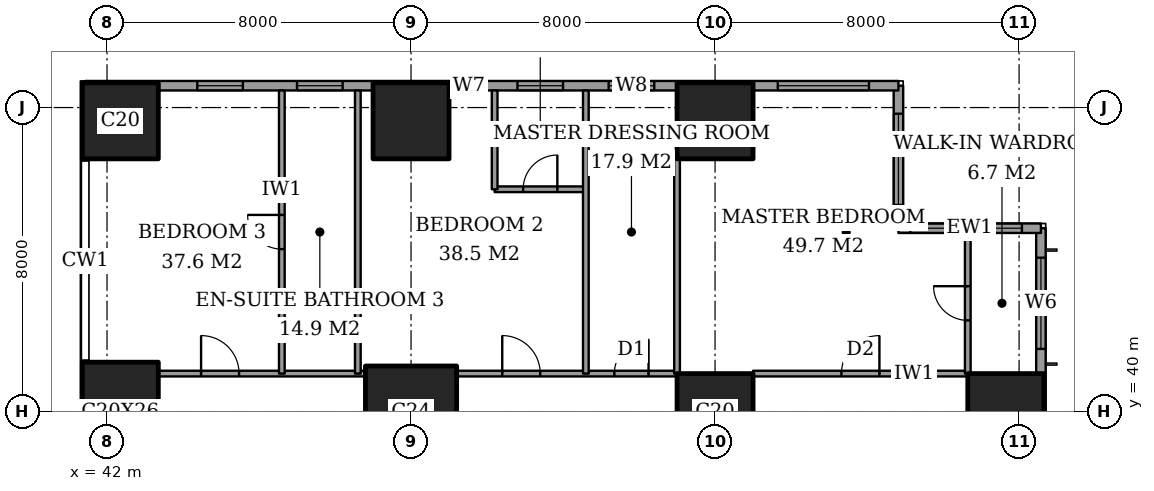
"""IFC4 building model, lengths in metres.
Left out: names, types, materials, properties, quantities, classifications, styles, units other than length and angle.
Written with IfcOpenShell. Run it as: python <this file> out.ifc"""

import sys

from ifc_helpers import new_model, si_unit, direction, frame, frame_2d, origin, origin_2d, place, context, subcontext, project, spatial, rectangle, extrude, element, fill, save


model = new_model("IFC4")
c1 = context("Model", 3, precision=1e-05, world=origin(), true_north=direction((0.0, 1.0)))
c2 = subcontext(c1, "Body", "Model", "MODEL_VIEW")
j1 = project(units=[si_unit("LENGTHUNIT", "METRE"), si_unit("PLANEANGLEUNIT", "RADIAN")], contexts=[c1])
p1 = place(None, origin())
s1 = spatial("IfcSite", under=j1, at=p1, CompositionType="ELEMENT")
p2 = place(p1, origin())
s2 = spatial("IfcBuilding", under=s1, at=p2, CompositionType="ELEMENT")
p3 = place(p2, frame((0.0, 0.0, 36.8)))
s3 = spatial("IfcBuildingStorey", under=s2, at=p3, CompositionType="ELEMENT", Elevation=36.8)
p4 = place(p3, frame((42.35, 40.0, 0.0), z_axis=(0.0, 0.0, 1.0), x_axis=(1.0, 0.0, 0.0)))
e1 = element("IfcColumn", 1, at=p4, inside=s3, PredefinedType="COLUMN", context=c2, shape_type="SweptSolid", body=[
    extrude(rectangle(XDim=2.0, YDim=2.6, at=origin_2d()), origin(), (0.0, 0.0, 1.0), 3.6),
])
p5 = place(p3, frame((42.35, 47.65, 0.0), z_axis=(0.0, 0.0, 1.0), x_axis=(1.0, 0.0, 0.0)))
e2 = element("IfcColumn", 2, at=p5, inside=s3, PredefinedType="COLUMN", context=c2, shape_type="SweptSolid", body=[
    extrude(rectangle(XDim=2.0, YDim=2.0, at=origin_2d()), origin(), (0.0, 0.0, 1.0), 3.6),
])
p6 = place(p3, frame((50.0, 40.0, 0.0), z_axis=(0.0, 0.0, 1.0), x_axis=(1.0, 0.0, 0.0)))
e3 = element("IfcColumn", 3, at=p6, inside=s3, PredefinedType="COLUMN", context=c2, shape_type="SweptSolid", body=[
    extrude(rectangle(XDim=2.4, YDim=2.4, at=origin_2d()), origin(), (0.0, 0.0, 1.0), 3.6),
])
for number, where, z_axis, x_axis in (
    (4, (50.0, 47.65, 0.0), (0.0, 0.0, 1.0), (1.0, 0.0, 0.0)),
    (5, (58.0, 40.0, 0.0), (0.0, 0.0, 1.0), (1.0, 0.0, 0.0)),
    (6, (58.0, 47.65, 0.0), (0.0, 0.0, 1.0), (1.0, 0.0, 0.0)),
    (7, (65.65, 40.0, 0.0), (0.0, 0.0, 1.0), (1.0, 0.0, 0.0)),
):
    element("IfcColumn", number, at=place(p3, frame(where, z_axis=z_axis, x_axis=x_axis)), inside=s3, PredefinedType="COLUMN", context=c2, shape_type="SweptSolid", body=[
        extrude(rectangle(XDim=2.0, YDim=2.0, at=origin_2d()), origin(), (0.0, 0.0, 1.0), 3.6),
    ])
p7 = place(p3, frame((66.575, 3.175, 0.0), z_axis=(0.0, 0.0, 1.0), x_axis=(0.0, 1.0, 0.0)))
e8 = element("IfcWall", 8, at=p7, inside=s3, PredefinedType="SOLIDWALL", context=c2, shape_type="SweptSolid", body=[
    extrude(rectangle(XDim=41.65, YDim=0.25, at=frame_2d((20.825, 0.0))), origin(), (0.0, 0.0, 1.0), 3.6),
])
p8 = place(p7, frame((0.775, 0.0, 0.6)))
e9 = element("IfcOpeningElement", 9, at=p8, cuts=e8, PredefinedType="OPENING", context=c2, shape_type="SweptSolid", body=[
    extrude(rectangle(XDim=2.4, YDim=2.0, at=frame_2d((1.2, 1.0))), frame((0.0, 0.135, 0.0), z_axis=(0.0, -1.0, 0.0), x_axis=(1.0, 0.0, 0.0)), (0.0, 0.0, 1.0), 0.27),
])
p9 = place(p7, frame((6.1, 0.0, 0.6)))
e10 = element("IfcOpeningElement", 10, at=p9, cuts=e8, PredefinedType="OPENING", context=c2, shape_type="SweptSolid", body=[
    extrude(rectangle(XDim=1.2, YDim=2.0, at=frame_2d((0.6, 1.0))), frame((0.0, 0.135, 0.0), z_axis=(0.0, -1.0, 0.0), x_axis=(1.0, 0.0, 0.0)), (0.0, 0.0, 1.0), 0.27),
])
p10 = place(p7, frame((8.275, 0.0, 0.6)))
e11 = element("IfcOpeningElement", 11, at=p10, cuts=e8, PredefinedType="OPENING", context=c2, shape_type="SweptSolid", body=[
    extrude(rectangle(XDim=2.4, YDim=2.0, at=frame_2d((1.2, 1.0))), frame((0.0, 0.135, 0.0), z_axis=(0.0, -1.0, 0.0), x_axis=(1.0, 0.0, 0.0)), (0.0, 0.0, 1.0), 0.27),
])
p11 = place(p7, frame((15.775, 0.0, 0.6)))
e12 = element("IfcOpeningElement", 12, at=p11, cuts=e8, PredefinedType="OPENING", context=c2, shape_type="SweptSolid", body=[
    extrude(rectangle(XDim=2.4, YDim=2.0, at=frame_2d((1.2, 1.0))), frame((0.0, 0.135, 0.0), z_axis=(0.0, -1.0, 0.0), x_axis=(1.0, 0.0, 0.0)), (0.0, 0.0, 1.0), 0.27),
])
p12 = place(p7, frame((23.475, 0.0, 0.6)))
e13 = element("IfcOpeningElement", 13, at=p12, cuts=e8, PredefinedType="OPENING", context=c2, shape_type="SweptSolid", body=[
    extrude(rectangle(XDim=2.4, YDim=2.0, at=frame_2d((1.2, 1.0))), frame((0.0, 0.135, 0.0), z_axis=(0.0, -1.0, 0.0), x_axis=(1.0, 0.0, 0.0)), (0.0, 0.0, 1.0), 0.27),
])
p13 = place(p7, frame((30.975, 0.0, 0.6)))
e14 = element("IfcOpeningElement", 14, at=p13, cuts=e8, PredefinedType="OPENING", context=c2, shape_type="SweptSolid", body=[
    extrude(rectangle(XDim=2.4, YDim=2.0, at=frame_2d((1.2, 1.0))), frame((0.0, 0.135, 0.0), z_axis=(0.0, -1.0, 0.0), x_axis=(1.0, 0.0, 0.0)), (0.0, 0.0, 1.0), 0.27),
])
p14 = place(p7, frame((34.5, 0.0, 0.6)))
e15 = element("IfcOpeningElement", 15, at=p14, cuts=e8, PredefinedType="OPENING", context=c2, shape_type="SweptSolid", body=[
    extrude(rectangle(XDim=1.2, YDim=2.0, at=frame_2d((0.6, 1.0))), frame((0.0, 0.135, 0.0), z_axis=(0.0, -1.0, 0.0), x_axis=(1.0, 0.0, 0.0)), (0.0, 0.0, 1.0), 0.27),
])
p15 = place(p7, frame((38.475, 0.0, 0.6)))
e16 = element("IfcOpeningElement", 16, at=p15, cuts=e8, PredefinedType="OPENING", context=c2, shape_type="SweptSolid", body=[
    extrude(rectangle(XDim=2.4, YDim=2.0, at=frame_2d((1.2, 1.0))), frame((0.0, 0.135, 0.0), z_axis=(0.0, -1.0, 0.0), x_axis=(1.0, 0.0, 0.0)), (0.0, 0.0, 1.0), 0.27),
])
p16 = place(p3, frame((66.575, 44.825, 0.0), z_axis=(0.0, 0.0, 1.0), x_axis=(-1.0, 0.0, 0.0)))
e17 = element("IfcWall", 17, at=p16, inside=s3, PredefinedType="SOLIDWALL", context=c2, shape_type="SweptSolid", body=[
    extrude(rectangle(XDim=3.75, YDim=0.25, at=frame_2d((1.875, 0.0))), origin(), (0.0, 0.0, 1.0), 3.6),
])
p17 = place(p16, frame((0.5, 0.0, 0.6)))
e18 = element("IfcOpeningElement", 18, at=p17, cuts=e17, PredefinedType="OPENING", context=c2, shape_type="SweptSolid", body=[
    extrude(rectangle(XDim=1.2, YDim=2.0, at=frame_2d((0.6, 1.0))), frame((0.0, 0.135, 0.0), z_axis=(0.0, -1.0, 0.0), x_axis=(1.0, 0.0, 0.0)), (0.0, 0.0, 1.0), 0.27),
])
p18 = place(p16, frame((2.238, 0.0, 0.6)))
e19 = element("IfcOpeningElement", 19, at=p18, cuts=e17, PredefinedType="OPENING", context=c2, shape_type="SweptSolid", body=[
    extrude(rectangle(XDim=1.2, YDim=2.0, at=frame_2d((0.6, 1.0))), frame((0.0, 0.135, 0.0), z_axis=(0.0, -1.0, 0.0), x_axis=(1.0, 0.0, 0.0)), (0.0, 0.0, 1.0), 0.27),
])
p19 = place(p3, frame((62.825, 44.825, 0.0), z_axis=(0.0, 0.0, 1.0), x_axis=(0.0, 1.0, 0.0)))
e20 = element("IfcWall", 20, at=p19, inside=s3, PredefinedType="SOLIDWALL", context=c2, shape_type="SweptSolid", body=[
    extrude(rectangle(XDim=3.75, YDim=0.25, at=frame_2d((1.875, 0.0))), origin(), (0.0, 0.0, 1.0), 3.6),
])
p20 = place(p19, frame((0.613, 0.0, 0.6)))
e21 = element("IfcOpeningElement", 21, at=p20, cuts=e20, PredefinedType="OPENING", context=c2, shape_type="SweptSolid", body=[
    extrude(rectangle(XDim=2.4, YDim=2.0, at=frame_2d((1.2, 1.0))), frame((0.0, 0.135, 0.0), z_axis=(0.0, -1.0, 0.0), x_axis=(1.0, 0.0, 0.0)), (0.0, 0.0, 1.0), 0.27),
])
p21 = place(p3, frame((62.825, 48.575, 0.0), z_axis=(0.0, 0.0, 1.0), x_axis=(-1.0, 0.0, 0.0)))
e22 = element("IfcWall", 22, at=p21, inside=s3, PredefinedType="SOLIDWALL", context=c2, shape_type="SweptSolid", body=[
    extrude(rectangle(XDim=21.4, YDim=0.25, at=frame_2d((10.7, 0.0))), origin(), (0.0, 0.0, 1.0), 3.6),
])
p22 = place(p21, frame((0.775, 0.0, 0.6)))
e23 = element("IfcOpeningElement", 23, at=p22, cuts=e22, PredefinedType="OPENING", context=c2, shape_type="SweptSolid", body=[
    extrude(rectangle(XDim=2.4, YDim=2.0, at=frame_2d((1.2, 1.0))), frame((0.0, 0.135, 0.0), z_axis=(0.0, -1.0, 0.0), x_axis=(1.0, 0.0, 0.0)), (0.0, 0.0, 1.0), 0.27),
])
p23 = place(p21, frame((6.425, 0.0, 0.6)))
e24 = element("IfcOpeningElement", 24, at=p23, cuts=e22, PredefinedType="OPENING", context=c2, shape_type="SweptSolid", body=[
    extrude(rectangle(XDim=1.2, YDim=2.0, at=frame_2d((0.6, 1.0))), frame((0.0, 0.135, 0.0), z_axis=(0.0, -1.0, 0.0), x_axis=(1.0, 0.0, 0.0)), (0.0, 0.0, 1.0), 0.27),
])
p24 = place(p21, frame((8.825, 0.0, 0.6)))
e25 = element("IfcOpeningElement", 25, at=p24, cuts=e22, PredefinedType="OPENING", context=c2, shape_type="SweptSolid", body=[
    extrude(rectangle(XDim=1.2, YDim=2.0, at=frame_2d((0.6, 1.0))), frame((0.0, 0.135, 0.0), z_axis=(0.0, -1.0, 0.0), x_axis=(1.0, 0.0, 0.0)), (0.0, 0.0, 1.0), 0.27),
])
p25 = place(p21, frame((11.0, 0.0, 0.6)))
e26 = element("IfcOpeningElement", 26, at=p25, cuts=e22, PredefinedType="OPENING", context=c2, shape_type="SweptSolid", body=[
    extrude(rectangle(XDim=0.6, YDim=2.0, at=frame_2d((0.3, 1.0))), frame((0.0, 0.135, 0.0), z_axis=(0.0, -1.0, 0.0), x_axis=(1.0, 0.0, 0.0)), (0.0, 0.0, 1.0), 0.27),
])
p26 = place(p21, frame((14.625, 0.0, 0.6)))
e27 = element("IfcOpeningElement", 27, at=p26, cuts=e22, PredefinedType="OPENING", context=c2, shape_type="SweptSolid", body=[
    extrude(rectangle(XDim=1.2, YDim=2.0, at=frame_2d((0.6, 1.0))), frame((0.0, 0.135, 0.0), z_axis=(0.0, -1.0, 0.0), x_axis=(1.0, 0.0, 0.0)), (0.0, 0.0, 1.0), 0.27),
])
p27 = place(p21, frame((17.25, 0.0, 0.6)))
e28 = element("IfcOpeningElement", 28, at=p27, cuts=e22, PredefinedType="OPENING", context=c2, shape_type="SweptSolid", body=[
    extrude(rectangle(XDim=1.2, YDim=2.0, at=frame_2d((0.6, 1.0))), frame((0.0, 0.135, 0.0), z_axis=(0.0, -1.0, 0.0), x_axis=(1.0, 0.0, 0.0)), (0.0, 0.0, 1.0), 0.27),
])
p28 = place(p3, frame((43.35, 41.0, 0.0), z_axis=(0.0, 0.0, 1.0), x_axis=(1.0, 0.0, 0.0)))
e29 = element("IfcWall", 29, at=p28, inside=s3, PredefinedType="PARTITIONING", context=c2, shape_type="SweptSolid", body=[
    extrude(rectangle(XDim=5.45, YDim=0.15, at=frame_2d((2.725, 0.0))), origin(), (0.0, 0.0, 1.0), 3.35),
])
p29 = place(p28, frame((1.125, 0.0, 0.0)))
e30 = element("IfcOpeningElement", 30, at=p29, cuts=e29, PredefinedType="OPENING", context=c2, shape_type="SweptSolid", body=[
    extrude(rectangle(XDim=1.0, YDim=2.1, at=frame_2d((0.5, 1.05))), frame((0.0, 0.085, 0.0), z_axis=(0.0, -1.0, 0.0), x_axis=(1.0, 0.0, 0.0)), (0.0, 0.0, 1.0), 0.17),
])
p30 = place(p3, frame((51.2, 41.0, 0.0), z_axis=(0.0, 0.0, 1.0), x_axis=(1.0, 0.0, 0.0)))
e31 = element("IfcWall", 31, at=p30, inside=s3, PredefinedType="PARTITIONING", context=c2, shape_type="SweptSolid", body=[
    extrude(rectangle(XDim=5.8, YDim=0.15, at=frame_2d((2.9, 0.0))), origin(), (0.0, 0.0, 1.0), 3.35),
])
p31 = place(p30, frame((4.15, 0.0, 0.0)))
e32 = element("IfcOpeningElement", 32, at=p31, cuts=e31, PredefinedType="OPENING", context=c2, shape_type="SweptSolid", body=[
    extrude(rectangle(XDim=0.9, YDim=2.1, at=frame_2d((0.45, 1.05))), frame((0.0, 0.085, 0.0), z_axis=(0.0, -1.0, 0.0), x_axis=(1.0, 0.0, 0.0)), (0.0, 0.0, 1.0), 0.17),
])
p32 = place(p30, frame((1.2, 0.0, 0.0)))
e33 = element("IfcOpeningElement", 33, at=p32, cuts=e31, PredefinedType="OPENING", context=c2, shape_type="SweptSolid", body=[
    extrude(rectangle(XDim=1.0, YDim=2.1, at=frame_2d((0.5, 1.05))), frame((0.0, 0.085, 0.0), z_axis=(0.0, -1.0, 0.0), x_axis=(1.0, 0.0, 0.0)), (0.0, 0.0, 1.0), 0.17),
])
p33 = place(p3, frame((59.0, 41.0, 0.0), z_axis=(0.0, 0.0, 1.0), x_axis=(1.0, 0.0, 0.0)))
e34 = element("IfcWall", 34, at=p33, inside=s3, PredefinedType="PARTITIONING", context=c2, shape_type="SweptSolid", body=[
    extrude(rectangle(XDim=5.65, YDim=0.15, at=frame_2d((2.825, 0.0))), origin(), (0.0, 0.0, 1.0), 3.35),
])
p34 = place(p33, frame((2.325, 0.0, 0.0)))
e35 = element("IfcOpeningElement", 35, at=p34, cuts=e34, PredefinedType="OPENING", context=c2, shape_type="SweptSolid", body=[
    extrude(rectangle(XDim=1.0, YDim=2.1, at=frame_2d((0.5, 1.05))), frame((0.0, 0.085, 0.0), z_axis=(0.0, -1.0, 0.0), x_axis=(1.0, 0.0, 0.0)), (0.0, 0.0, 1.0), 0.17),
])
p35 = place(p3, frame((52.2, 45.85, 0.0), z_axis=(0.0, 0.0, 1.0), x_axis=(1.0, 0.0, 0.0)))
e36 = element("IfcWall", 36, at=p35, inside=s3, PredefinedType="PARTITIONING", context=c2, shape_type="SweptSolid", body=[
    extrude(rectangle(XDim=2.4, YDim=0.15, at=frame_2d((1.2, 0.0))), origin(), (0.0, 0.0, 1.0), 3.35),
])
p36 = place(p35, frame((0.75, 0.0, 0.0)))
e37 = element("IfcOpeningElement", 37, at=p36, cuts=e36, PredefinedType="OPENING", context=c2, shape_type="SweptSolid", body=[
    extrude(rectangle(XDim=0.9, YDim=2.1, at=frame_2d((0.45, 1.05))), frame((0.0, 0.085, 0.0), z_axis=(0.0, -1.0, 0.0), x_axis=(1.0, 0.0, 0.0)), (0.0, 0.0, 1.0), 0.17),
])
p37 = place(p3, frame((46.6, 41.0, 0.0), z_axis=(0.0, 0.0, 1.0), x_axis=(0.0, 1.0, 0.0)))
e38 = element("IfcWall", 38, at=p37, inside=s3, PredefinedType="PARTITIONING", context=c2, shape_type="SweptSolid", body=[
    extrude(rectangle(XDim=7.45, YDim=0.15, at=frame_2d((3.725, 0.0))), origin(), (0.0, 0.0, 1.0), 3.35),
])
p38 = place(p37, frame((3.275, 0.0, 0.0)))
e39 = element("IfcOpeningElement", 39, at=p38, cuts=e38, PredefinedType="OPENING", context=c2, shape_type="SweptSolid", body=[
    extrude(rectangle(XDim=0.9, YDim=2.1, at=frame_2d((0.45, 1.05))), frame((0.0, 0.085, 0.0), z_axis=(0.0, -1.0, 0.0), x_axis=(1.0, 0.0, 0.0)), (0.0, 0.0, 1.0), 0.17),
])
p39 = place(p3, frame((48.6, 41.0, 0.0), z_axis=(0.0, 0.0, 1.0), x_axis=(0.0, 1.0, 0.0)))
e40 = element("IfcWall", 40, at=p39, inside=s3, PredefinedType="PARTITIONING", context=c2, shape_type="SweptSolid", body=[
    extrude(rectangle(XDim=7.45, YDim=0.15, at=frame_2d((3.725, 0.0))), origin(), (0.0, 0.0, 1.0), 3.35),
])
p40 = place(p3, frame((52.2, 45.85, 0.0), z_axis=(0.0, 0.0, 1.0), x_axis=(0.0, 1.0, 0.0)))
e41 = element("IfcWall", 41, at=p40, inside=s3, PredefinedType="PARTITIONING", context=c2, shape_type="SweptSolid", body=[
    extrude(rectangle(XDim=2.6, YDim=0.15, at=frame_2d((1.3, 0.0))), origin(), (0.0, 0.0, 1.0), 3.35),
])
p41 = place(p3, frame((54.6, 41.0, 0.0), z_axis=(0.0, 0.0, 1.0), x_axis=(0.0, 1.0, 0.0)))
e42 = element("IfcWall", 42, at=p41, inside=s3, PredefinedType="PARTITIONING", context=c2, shape_type="SweptSolid", body=[
    extrude(rectangle(XDim=7.45, YDim=0.15, at=frame_2d((3.725, 0.0))), origin(), (0.0, 0.0, 1.0), 3.35),
])
p42 = place(p3, frame((57.0, 41.0, 0.0), z_axis=(0.0, 0.0, 1.0), x_axis=(0.0, 1.0, 0.0)))
e43 = element("IfcWall", 43, at=p42, inside=s3, PredefinedType="PARTITIONING", context=c2, shape_type="SweptSolid", body=[
    extrude(rectangle(XDim=5.65, YDim=0.15, at=frame_2d((2.825, 0.0))), origin(), (0.0, 0.0, 1.0), 3.35),
])
p43 = place(p3, frame((64.65, 41.0, 0.0), z_axis=(0.0, 0.0, 1.0), x_axis=(0.0, 1.0, 0.0)))
e44 = element("IfcWall", 44, at=p43, inside=s3, PredefinedType="PARTITIONING", context=c2, shape_type="SweptSolid", body=[
    extrude(rectangle(XDim=3.7, YDim=0.15, at=frame_2d((1.85, 0.0))), origin(), (0.0, 0.0, 1.0), 3.35),
])
p44 = place(p43, frame((1.4, 0.0, 0.0)))
e45 = element("IfcOpeningElement", 45, at=p44, cuts=e44, PredefinedType="OPENING", context=c2, shape_type="SweptSolid", body=[
    extrude(rectangle(XDim=0.9, YDim=2.1, at=frame_2d((0.45, 1.05))), frame((0.0, 0.085, 0.0), z_axis=(0.0, -1.0, 0.0), x_axis=(1.0, 0.0, 0.0)), (0.0, 0.0, 1.0), 0.17),
])
p45 = place(p15, origin())
e46 = element("IfcWindow", 46, at=p45, inside=s3, PartitioningType="SINGLE_PANEL", PredefinedType="WINDOW", context=c2, shape_type="SweptSolid", body=[
    extrude(rectangle(XDim=2.4, YDim=2.0, at=frame_2d((1.2, 1.0))), frame((0.0, 0.03, 0.0), z_axis=(0.0, -1.0, 0.0), x_axis=(1.0, 0.0, 0.0)), (0.0, 0.0, 1.0), 0.06),
])
fill(e16, e46)
p46 = place(p17, origin())
e47 = element("IfcWindow", 47, at=p46, inside=s3, PartitioningType="SINGLE_PANEL", PredefinedType="WINDOW", context=c2, shape_type="SweptSolid", body=[
    extrude(rectangle(XDim=1.2, YDim=2.0, at=frame_2d((0.6, 1.0))), frame((0.0, 0.03, 0.0), z_axis=(0.0, -1.0, 0.0), x_axis=(1.0, 0.0, 0.0)), (0.0, 0.0, 1.0), 0.06),
])
fill(e18, e47)
p47 = place(p18, origin())
e48 = element("IfcWindow", 48, at=p47, inside=s3, PartitioningType="SINGLE_PANEL", PredefinedType="WINDOW", context=c2, shape_type="SweptSolid", body=[
    extrude(rectangle(XDim=1.2, YDim=2.0, at=frame_2d((0.6, 1.0))), frame((0.0, 0.03, 0.0), z_axis=(0.0, -1.0, 0.0), x_axis=(1.0, 0.0, 0.0)), (0.0, 0.0, 1.0), 0.06),
])
fill(e19, e48)
p48 = place(p20, origin())
e49 = element("IfcWindow", 49, at=p48, inside=s3, PartitioningType="SINGLE_PANEL", PredefinedType="WINDOW", context=c2, shape_type="SweptSolid", body=[
    extrude(rectangle(XDim=2.4, YDim=2.0, at=frame_2d((1.2, 1.0))), frame((0.0, 0.03, 0.0), z_axis=(0.0, -1.0, 0.0), x_axis=(1.0, 0.0, 0.0)), (0.0, 0.0, 1.0), 0.06),
])
fill(e21, e49)
p49 = place(p22, origin())
e50 = element("IfcWindow", 50, at=p49, inside=s3, PartitioningType="SINGLE_PANEL", PredefinedType="WINDOW", context=c2, shape_type="SweptSolid", body=[
    extrude(rectangle(XDim=2.4, YDim=2.0, at=frame_2d((1.2, 1.0))), frame((0.0, 0.03, 0.0), z_axis=(0.0, -1.0, 0.0), x_axis=(1.0, 0.0, 0.0)), (0.0, 0.0, 1.0), 0.06),
])
fill(e23, e50)
p50 = place(p23, origin())
e51 = element("IfcWindow", 51, at=p50, inside=s3, PartitioningType="SINGLE_PANEL", PredefinedType="WINDOW", context=c2, shape_type="SweptSolid", body=[
    extrude(rectangle(XDim=1.2, YDim=2.0, at=frame_2d((0.6, 1.0))), frame((0.0, 0.03, 0.0), z_axis=(0.0, -1.0, 0.0), x_axis=(1.0, 0.0, 0.0)), (0.0, 0.0, 1.0), 0.06),
])
fill(e24, e51)
p51 = place(p24, origin())
e52 = element("IfcWindow", 52, at=p51, inside=s3, PartitioningType="SINGLE_PANEL", PredefinedType="WINDOW", context=c2, shape_type="SweptSolid", body=[
    extrude(rectangle(XDim=1.2, YDim=2.0, at=frame_2d((0.6, 1.0))), frame((0.0, 0.03, 0.0), z_axis=(0.0, -1.0, 0.0), x_axis=(1.0, 0.0, 0.0)), (0.0, 0.0, 1.0), 0.06),
])
fill(e25, e52)
p52 = place(p25, origin())
e53 = element("IfcWindow", 53, at=p52, inside=s3, PartitioningType="SINGLE_PANEL", PredefinedType="WINDOW", context=c2, shape_type="SweptSolid", body=[
    extrude(rectangle(XDim=0.6, YDim=2.0, at=frame_2d((0.3, 1.0))), frame((0.0, 0.03, 0.0), z_axis=(0.0, -1.0, 0.0), x_axis=(1.0, 0.0, 0.0)), (0.0, 0.0, 1.0), 0.06),
])
fill(e26, e53)
p53 = place(p26, origin())
e54 = element("IfcWindow", 54, at=p53, inside=s3, PartitioningType="SINGLE_PANEL", PredefinedType="WINDOW", context=c2, shape_type="SweptSolid", body=[
    extrude(rectangle(XDim=1.2, YDim=2.0, at=frame_2d((0.6, 1.0))), frame((0.0, 0.03, 0.0), z_axis=(0.0, -1.0, 0.0), x_axis=(1.0, 0.0, 0.0)), (0.0, 0.0, 1.0), 0.06),
])
fill(e27, e54)
p54 = place(p27, origin())
e55 = element("IfcWindow", 55, at=p54, inside=s3, PartitioningType="SINGLE_PANEL", PredefinedType="WINDOW", context=c2, shape_type="SweptSolid", body=[
    extrude(rectangle(XDim=1.2, YDim=2.0, at=frame_2d((0.6, 1.0))), frame((0.0, 0.03, 0.0), z_axis=(0.0, -1.0, 0.0), x_axis=(1.0, 0.0, 0.0)), (0.0, 0.0, 1.0), 0.06),
])
fill(e28, e55)
p55 = place(p44, origin())
e56 = element("IfcDoor", 56, at=p55, inside=s3, OperationType="SINGLE_SWING_LEFT", PredefinedType="DOOR", context=c2, shape_type="SweptSolid", body=[
    extrude(rectangle(XDim=0.9, YDim=2.1, at=frame_2d((0.45, 1.05))), frame((0.0, 0.025, 0.0), z_axis=(0.0, -1.0, 0.0), x_axis=(1.0, 0.0, 0.0)), (0.0, 0.0, 1.0), 0.05),
])
fill(e45, e56)
p56 = place(p34, origin())
e57 = element("IfcDoor", 57, at=p56, inside=s3, OperationType="SINGLE_SWING_LEFT", PredefinedType="DOOR", context=c2, shape_type="SweptSolid", body=[
    extrude(rectangle(XDim=1.0, YDim=2.1, at=frame_2d((0.5, 1.05))), frame((0.0, 0.025, 0.0), z_axis=(0.0, -1.0, 0.0), x_axis=(1.0, 0.0, 0.0)), (0.0, 0.0, 1.0), 0.05),
])
fill(e35, e57)
p57 = place(p31, origin())
e58 = element("IfcDoor", 58, at=p57, inside=s3, OperationType="SINGLE_SWING_LEFT", PredefinedType="DOOR", context=c2, shape_type="SweptSolid", body=[
    extrude(rectangle(XDim=0.9, YDim=2.1, at=frame_2d((0.45, 1.05))), frame((0.0, 0.025, 0.0), z_axis=(0.0, -1.0, 0.0), x_axis=(1.0, 0.0, 0.0)), (0.0, 0.0, 1.0), 0.05),
])
fill(e32, e58)
p58 = place(p36, origin())
e59 = element("IfcDoor", 59, at=p58, inside=s3, OperationType="SINGLE_SWING_LEFT", PredefinedType="DOOR", context=c2, shape_type="SweptSolid", body=[
    extrude(rectangle(XDim=0.9, YDim=2.1, at=frame_2d((0.45, 1.05))), frame((0.0, 0.025, 0.0), z_axis=(0.0, -1.0, 0.0), x_axis=(1.0, 0.0, 0.0)), (0.0, 0.0, 1.0), 0.05),
])
fill(e37, e59)
p59 = place(p32, origin())
e60 = element("IfcDoor", 60, at=p59, inside=s3, OperationType="SINGLE_SWING_RIGHT", PredefinedType="DOOR", context=c2, shape_type="SweptSolid", body=[
    extrude(rectangle(XDim=1.0, YDim=2.1, at=frame_2d((0.5, 1.05))), frame((0.0, 0.025, 0.0), z_axis=(0.0, -1.0, 0.0), x_axis=(1.0, 0.0, 0.0)), (0.0, 0.0, 1.0), 0.05),
])
fill(e33, e60)
p60 = place(p38, origin())
e61 = element("IfcDoor", 61, at=p60, inside=s3, OperationType="SINGLE_SWING_LEFT", PredefinedType="DOOR", context=c2, shape_type="SweptSolid", body=[
    extrude(rectangle(XDim=0.9, YDim=2.1, at=frame_2d((0.45, 1.05))), frame((0.0, 0.025, 0.0), z_axis=(0.0, -1.0, 0.0), x_axis=(1.0, 0.0, 0.0)), (0.0, 0.0, 1.0), 0.05),
])
fill(e39, e61)
p61 = place(p29, origin())
e62 = element("IfcDoor", 62, at=p61, inside=s3, OperationType="SINGLE_SWING_RIGHT", PredefinedType="DOOR", context=c2, shape_type="SweptSolid", body=[
    extrude(rectangle(XDim=1.0, YDim=2.1, at=frame_2d((0.5, 1.05))), frame((0.0, 0.025, 0.0), z_axis=(0.0, -1.0, 0.0), x_axis=(1.0, 0.0, 0.0)), (0.0, 0.0, 1.0), 0.05),
])
fill(e30, e62)
save(model, sys.argv[1])
